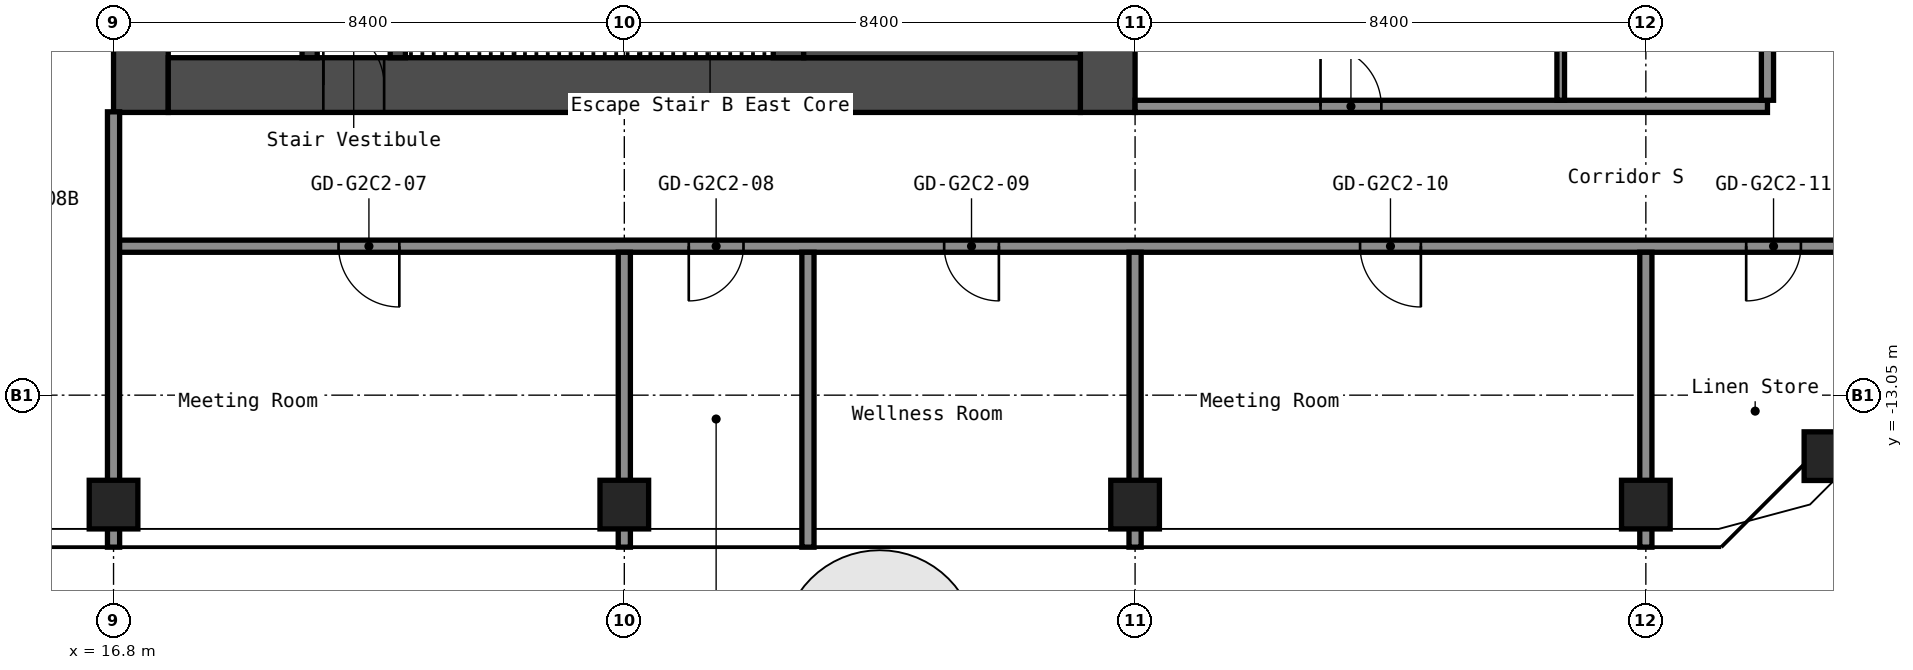
"""IFC4 building model, lengths in metres.
Left out: names, types, materials, properties, quantities, classifications, styles, units other than length and angle.
Written with IfcOpenShell. Run it as: python <this file> out.ifc"""

import sys

from ifc_helpers import new_model, si_unit, direction, frame, frame_2d, origin, origin_2d, place, context, subcontext, project, spatial, rectangle, hollow_rectangle, extrude, element, fill, save


model = new_model("IFC4")
c1 = context("Model", 3, precision=1e-05, world=origin(), true_north=direction((0.0, 1.0)))
c2 = subcontext(c1, "Body", "Model", "MODEL_VIEW")
j1 = project(units=[si_unit("LENGTHUNIT", "METRE"), si_unit("PLANEANGLEUNIT", "RADIAN")], contexts=[c1])
p1 = place(None, origin())
s1 = spatial("IfcSite", under=j1, at=p1, CompositionType="ELEMENT")
p2 = place(p1, origin())
s2 = spatial("IfcBuilding", under=s1, at=p2, CompositionType="ELEMENT")
p3 = place(p2, frame((0.0, 0.0, 113.8)))
s3 = spatial("IfcBuildingStorey", under=s2, at=p3, CompositionType="ELEMENT", Elevation=113.8)
for number, where, z_axis, x_axis in (
    (1, (16.8, -14.85, 0.0), (0.0, 0.0, 1.0), (1.0, 0.0, 0.0)),
    (2, (25.2, -14.85, 0.0), (0.0, 0.0, 1.0), (1.0, 0.0, 0.0)),
    (3, (33.6, -14.85, 0.0), (0.0, 0.0, 1.0), (1.0, 0.0, 0.0)),
    (4, (42.0, -14.85, 0.0), (0.0, 0.0, 1.0), (1.0, 0.0, 0.0)),
    (5, (45.003, -14.053, 0.0), (0.0, 0.0, 1.0), (1.0, 0.0, 0.0)),
):
    element("IfcColumn", number, at=place(p3, frame(where, z_axis=z_axis, x_axis=x_axis)), inside=s3, PredefinedType="COLUMN", context=c2, shape_type="SweptSolid", body=[
        extrude(hollow_rectangle(XDim=0.8, YDim=0.8, WallThickness=0.032, at=origin_2d()), origin(), (0.0, 0.0, 1.0), 2.8),
    ])
p4 = place(p3, frame((17.25, -8.4, 0.0), z_axis=(0.0, 0.0, 1.0), x_axis=(0.0, 1.0, 0.0)))
e6 = element("IfcWall", 6, at=p4, inside=s3, PredefinedType="SHEAR", context=c2, shape_type="SweptSolid", body=[
    extrude(rectangle(XDim=16.8, YDim=0.9, at=frame_2d((8.4, 0.0))), origin(), (0.0, 0.0, 1.0), 2.8),
])
p5 = place(p4, frame((7.6, 0.0, 0.0)))
e7 = element("IfcOpeningElement", 7, at=p5, cuts=e6, PredefinedType="OPENING", context=c2, shape_type="SweptSolid", body=[
    extrude(rectangle(XDim=1.2, YDim=2.1, at=frame_2d((0.6, 1.05))), frame((0.0, 0.46, 0.0), z_axis=(0.0, -1.0, 0.0), x_axis=(1.0, 0.0, 0.0)), (0.0, 0.0, 1.0), 0.92),
])
p6 = place(p3, frame((33.15, -8.4, 0.0), z_axis=(0.0, 0.0, 1.0), x_axis=(0.0, 1.0, 0.0)))
e8 = element("IfcWall", 8, at=p6, inside=s3, PredefinedType="SHEAR", context=c2, shape_type="SweptSolid", body=[
    extrude(rectangle(XDim=16.8, YDim=0.9, at=frame_2d((8.4, 0.0))), origin(), (0.0, 0.0, 1.0), 2.8),
])
p7 = place(p3, frame((17.7, -7.95, 0.0), z_axis=(0.0, 0.0, 1.0), x_axis=(1.0, 0.0, 0.0)))
e9 = element("IfcWall", 9, at=p7, inside=s3, PredefinedType="SHEAR", context=c2, shape_type="SweptSolid", body=[
    extrude(rectangle(XDim=15.0, YDim=0.9, at=frame_2d((7.5, 0.0))), origin(), (0.0, 0.0, 1.0), 2.8),
])
p8 = place(p7, frame((2.55, 0.0, 0.0)))
e10 = element("IfcOpeningElement", 10, at=p8, cuts=e9, PredefinedType="OPENING", context=c2, shape_type="SweptSolid", body=[
    extrude(rectangle(XDim=1.0, YDim=2.1, at=frame_2d((0.5, 1.05))), frame((0.0, 0.46, 0.0), z_axis=(0.0, -1.0, 0.0), x_axis=(1.0, 0.0, 0.0)), (0.0, 0.0, 1.0), 0.92),
])
p9 = place(p3, frame((20.025, -7.5, 0.0), z_axis=(0.0, 0.0, 1.0), x_axis=(0.0, 1.0, 0.0)))
e11 = element("IfcWall", 11, at=p9, inside=s3, PredefinedType="SHEAR", context=c2, shape_type="SweptSolid", body=[
    extrude(rectangle(XDim=6.3, YDim=0.25, at=frame_2d((3.15, 0.0))), origin(), (0.0, 0.0, 1.0), 2.8),
])
p10 = place(p9, frame((2.4, 0.0, 0.0)))
e12 = element("IfcOpeningElement", 12, at=p10, cuts=e11, PredefinedType="OPENING", context=c2, shape_type="SweptSolid", body=[
    extrude(rectangle(XDim=1.0, YDim=2.1, at=frame_2d((0.5, 1.05))), frame((0.0, 0.135, 0.0), z_axis=(0.0, -1.0, 0.0), x_axis=(1.0, 0.0, 0.0)), (0.0, 0.0, 1.0), 0.27),
])
p11 = place(p3, frame((21.475, -7.5, 0.0), z_axis=(0.0, 0.0, 1.0), x_axis=(0.0, 1.0, 0.0)))
e13 = element("IfcWall", 13, at=p11, inside=s3, PredefinedType="SHEAR", context=c2, shape_type="SweptSolid", body=[
    extrude(rectangle(XDim=3.75, YDim=0.25, at=frame_2d((1.875, 0.0))), origin(), (0.0, 0.0, 1.0), 2.8),
])
p12 = place(p11, frame((1.3, 0.0, 0.0)))
e14 = element("IfcOpeningElement", 14, at=p12, cuts=e13, PredefinedType="OPENING", context=c2, shape_type="SweptSolid", body=[
    extrude(rectangle(XDim=1.2, YDim=2.1, at=frame_2d((0.6, 1.05))), frame((0.0, 0.135, 0.0), z_axis=(0.0, -1.0, 0.0), x_axis=(1.0, 0.0, 0.0)), (0.0, 0.0, 1.0), 0.27),
])
p13 = place(p3, frame((27.9, -7.5, 0.0), z_axis=(0.0, 0.0, 1.0), x_axis=(0.0, 1.0, 0.0)))
e15 = element("IfcWall", 15, at=p13, inside=s3, PredefinedType="SHEAR", context=c2, shape_type="SweptSolid", body=[
    extrude(rectangle(XDim=3.75, YDim=0.5, at=frame_2d((1.875, 0.0))), origin(), (0.0, 0.0, 1.0), 2.8),
])
p14 = place(p3, frame((28.15, -6.75, 0.0), z_axis=(0.0, 0.0, 1.0), x_axis=(1.0, 0.0, 0.0)))
e16 = element("IfcWall", 16, at=p14, inside=s3, PredefinedType="SHEAR", context=c2, shape_type="SweptSolid", body=[
    extrude(rectangle(XDim=4.55, YDim=1.5, at=frame_2d((2.275, 0.0))), origin(), (0.0, 0.0, 1.0), 2.8),
])
p15 = place(p3, frame((16.8, -10.6, 0.0), z_axis=(0.0, 0.0, 1.0), x_axis=(1.0, 0.0, 0.0)))
e17 = element("IfcWall", 17, at=p15, inside=s3, PredefinedType="PARTITIONING", context=c2, shape_type="SweptSolid", body=[
    extrude(rectangle(XDim=29.7, YDim=0.2, at=frame_2d((14.85, 0.0))), origin(), (0.0, 0.0, 1.0), 2.8),
])
p16 = place(p15, frame((3.7, 0.0, 0.0)))
e18 = element("IfcOpeningElement", 18, at=p16, cuts=e17, PredefinedType="OPENING", context=c2, shape_type="SweptSolid", body=[
    extrude(rectangle(XDim=1.0, YDim=2.1, at=frame_2d((0.5, 1.05))), frame((0.0, 0.11, 0.0), z_axis=(0.0, -1.0, 0.0), x_axis=(1.0, 0.0, 0.0)), (0.0, 0.0, 1.0), 0.22),
])
p17 = place(p15, frame((9.46, 0.0, 0.0)))
e19 = element("IfcOpeningElement", 19, at=p17, cuts=e17, PredefinedType="OPENING", context=c2, shape_type="SweptSolid", body=[
    extrude(rectangle(XDim=0.9, YDim=2.1, at=frame_2d((0.45, 1.05))), frame((0.0, 0.11, 0.0), z_axis=(0.0, -1.0, 0.0), x_axis=(1.0, 0.0, 0.0)), (0.0, 0.0, 1.0), 0.22),
])
p18 = place(p15, frame((13.66, 0.0, 0.0)))
e20 = element("IfcOpeningElement", 20, at=p18, cuts=e17, PredefinedType="OPENING", context=c2, shape_type="SweptSolid", body=[
    extrude(rectangle(XDim=0.9, YDim=2.1, at=frame_2d((0.45, 1.05))), frame((0.0, 0.11, 0.0), z_axis=(0.0, -1.0, 0.0), x_axis=(1.0, 0.0, 0.0)), (0.0, 0.0, 1.0), 0.22),
])
p19 = place(p15, frame((20.5, 0.0, 0.0)))
e21 = element("IfcOpeningElement", 21, at=p19, cuts=e17, PredefinedType="OPENING", context=c2, shape_type="SweptSolid", body=[
    extrude(rectangle(XDim=1.0, YDim=2.1, at=frame_2d((0.5, 1.05))), frame((0.0, 0.11, 0.0), z_axis=(0.0, -1.0, 0.0), x_axis=(1.0, 0.0, 0.0)), (0.0, 0.0, 1.0), 0.22),
])
p20 = place(p15, frame((26.85, 0.0, 0.0)))
e22 = element("IfcOpeningElement", 22, at=p20, cuts=e17, PredefinedType="OPENING", context=c2, shape_type="SweptSolid", body=[
    extrude(rectangle(XDim=0.9, YDim=2.1, at=frame_2d((0.45, 1.05))), frame((0.0, 0.11, 0.0), z_axis=(0.0, -1.0, 0.0), x_axis=(1.0, 0.0, 0.0)), (0.0, 0.0, 1.0), 0.22),
])
p21 = place(p3, frame((33.6, -8.3, 0.0), z_axis=(0.0, 0.0, 1.0), x_axis=(1.0, 0.0, 0.0)))
e23 = element("IfcWall", 23, at=p21, inside=s3, PredefinedType="PARTITIONING", context=c2, shape_type="SweptSolid", body=[
    extrude(rectangle(XDim=10.4, YDim=0.2, at=frame_2d((5.2, 0.0))), origin(), (0.0, 0.0, 1.0), 2.8),
])
p22 = place(p21, frame((3.05, 0.0, 0.0)))
e24 = element("IfcOpeningElement", 24, at=p22, cuts=e23, PredefinedType="OPENING", context=c2, shape_type="SweptSolid", body=[
    extrude(rectangle(XDim=1.0, YDim=2.1, at=frame_2d((0.5, 1.05))), frame((0.0, 0.11, 0.0), z_axis=(0.0, -1.0, 0.0), x_axis=(1.0, 0.0, 0.0)), (0.0, 0.0, 1.0), 0.22),
])
p23 = place(p3, frame((16.8, -15.55, 0.0), z_axis=(0.0, 0.0, 1.0), x_axis=(0.0, 1.0, 0.0)))
e25 = element("IfcWall", 25, at=p23, inside=s3, PredefinedType="PARTITIONING", context=c2, shape_type="SweptSolid", body=[
    extrude(rectangle(XDim=7.16, YDim=0.2, at=frame_2d((3.58, 0.0))), origin(), (0.0, 0.0, 1.0), 2.8),
])
for number, where, z_axis, x_axis in (
    (26, (25.2, -15.55, 0.0), (0.0, 0.0, 1.0), (0.0, 1.0, 0.0)),
    (27, (28.22, -15.55, 0.0), (0.0, 0.0, 1.0), (0.0, 1.0, 0.0)),
    (28, (33.6, -15.55, 0.0), (0.0, 0.0, 1.0), (0.0, 1.0, 0.0)),
):
    element("IfcWall", number, at=place(p3, frame(where, z_axis=z_axis, x_axis=x_axis)), inside=s3, PredefinedType="PARTITIONING", context=c2, shape_type="SweptSolid", body=[
        extrude(rectangle(XDim=4.85, YDim=0.2, at=frame_2d((2.425, 0.0))), origin(), (0.0, 0.0, 1.0), 2.8),
    ])
p24 = place(p3, frame((40.6, -8.2, 0.0), z_axis=(0.0, 0.0, 1.0), x_axis=(0.0, 1.0, 0.0)))
e29 = element("IfcWall", 29, at=p24, inside=s3, PredefinedType="PARTITIONING", context=c2, shape_type="SweptSolid", body=[
    extrude(rectangle(XDim=3.3, YDim=0.125, at=frame_2d((1.65, 0.0))), origin(), (0.0, 0.0, 1.0), 2.8),
])
p25 = place(p3, frame((42.0, -15.55, 0.0), z_axis=(0.0, 0.0, 1.0), x_axis=(0.0, 1.0, 0.0)))
e30 = element("IfcWall", 30, at=p25, inside=s3, PredefinedType="PARTITIONING", context=c2, shape_type="SweptSolid", body=[
    extrude(rectangle(XDim=4.85, YDim=0.2, at=frame_2d((2.425, 0.0))), origin(), (0.0, 0.0, 1.0), 2.8),
])
p26 = place(p3, frame((44.0, -8.2, 0.0), z_axis=(0.0, 0.0, 1.0), x_axis=(0.0, 1.0, 0.0)))
e31 = element("IfcWall", 31, at=p26, inside=s3, PredefinedType="PARTITIONING", context=c2, shape_type="SweptSolid", body=[
    extrude(rectangle(XDim=16.4, YDim=0.2, at=frame_2d((8.2, 0.0))), origin(), (0.0, 0.0, 1.0), 2.8),
])
p27 = place(p8, origin())
e32 = element("IfcDoor", 32, at=p27, inside=s3, OperationType="SINGLE_SWING_RIGHT", PredefinedType="DOOR", context=c2, shape_type="SweptSolid", body=[
    extrude(rectangle(XDim=1.0, YDim=2.1, at=frame_2d((0.5, 1.05))), frame((0.0, 0.025, 0.0), z_axis=(0.0, -1.0, 0.0), x_axis=(1.0, 0.0, 0.0)), (0.0, 0.0, 1.0), 0.05),
])
fill(e10, e32)
p28 = place(p16, origin())
e33 = element("IfcDoor", 33, at=p28, inside=s3, OperationType="SINGLE_SWING_RIGHT", PredefinedType="DOOR", context=c2, shape_type="SweptSolid", body=[
    extrude(rectangle(XDim=1.0, YDim=2.1, at=frame_2d((0.5, 1.05))), frame((0.0, 0.025, 0.0), z_axis=(0.0, -1.0, 0.0), x_axis=(1.0, 0.0, 0.0)), (0.0, 0.0, 1.0), 0.05),
])
fill(e18, e33)
p29 = place(p17, origin())
e34 = element("IfcDoor", 34, at=p29, inside=s3, OperationType="SINGLE_SWING_LEFT", PredefinedType="DOOR", context=c2, shape_type="SweptSolid", body=[
    extrude(rectangle(XDim=0.9, YDim=2.1, at=frame_2d((0.45, 1.05))), frame((0.0, 0.025, 0.0), z_axis=(0.0, -1.0, 0.0), x_axis=(1.0, 0.0, 0.0)), (0.0, 0.0, 1.0), 0.05),
])
fill(e19, e34)
p30 = place(p18, origin())
e35 = element("IfcDoor", 35, at=p30, inside=s3, OperationType="SINGLE_SWING_RIGHT", PredefinedType="DOOR", context=c2, shape_type="SweptSolid", body=[
    extrude(rectangle(XDim=0.9, YDim=2.1, at=frame_2d((0.45, 1.05))), frame((0.0, 0.025, 0.0), z_axis=(0.0, -1.0, 0.0), x_axis=(1.0, 0.0, 0.0)), (0.0, 0.0, 1.0), 0.05),
])
fill(e20, e35)
p31 = place(p19, origin())
e36 = element("IfcDoor", 36, at=p31, inside=s3, OperationType="SINGLE_SWING_RIGHT", PredefinedType="DOOR", context=c2, shape_type="SweptSolid", body=[
    extrude(rectangle(XDim=1.0, YDim=2.1, at=frame_2d((0.5, 1.05))), frame((0.0, 0.025, 0.0), z_axis=(0.0, -1.0, 0.0), x_axis=(1.0, 0.0, 0.0)), (0.0, 0.0, 1.0), 0.05),
])
fill(e21, e36)
p32 = place(p20, origin())
e37 = element("IfcDoor", 37, at=p32, inside=s3, OperationType="SINGLE_SWING_LEFT", PredefinedType="DOOR", context=c2, shape_type="SweptSolid", body=[
    extrude(rectangle(XDim=0.9, YDim=2.1, at=frame_2d((0.45, 1.05))), frame((0.0, 0.025, 0.0), z_axis=(0.0, -1.0, 0.0), x_axis=(1.0, 0.0, 0.0)), (0.0, 0.0, 1.0), 0.05),
])
fill(e22, e37)
p33 = place(p22, origin())
e38 = element("IfcDoor", 38, at=p33, inside=s3, OperationType="SINGLE_SWING_RIGHT", PredefinedType="DOOR", context=c2, shape_type="SweptSolid", body=[
    extrude(rectangle(XDim=1.0, YDim=2.1, at=frame_2d((0.5, 1.05))), frame((0.0, 0.025, 0.0), z_axis=(0.0, -1.0, 0.0), x_axis=(1.0, 0.0, 0.0)), (0.0, 0.0, 1.0), 0.05),
])
fill(e24, e38)
save(model, sys.argv[1])
